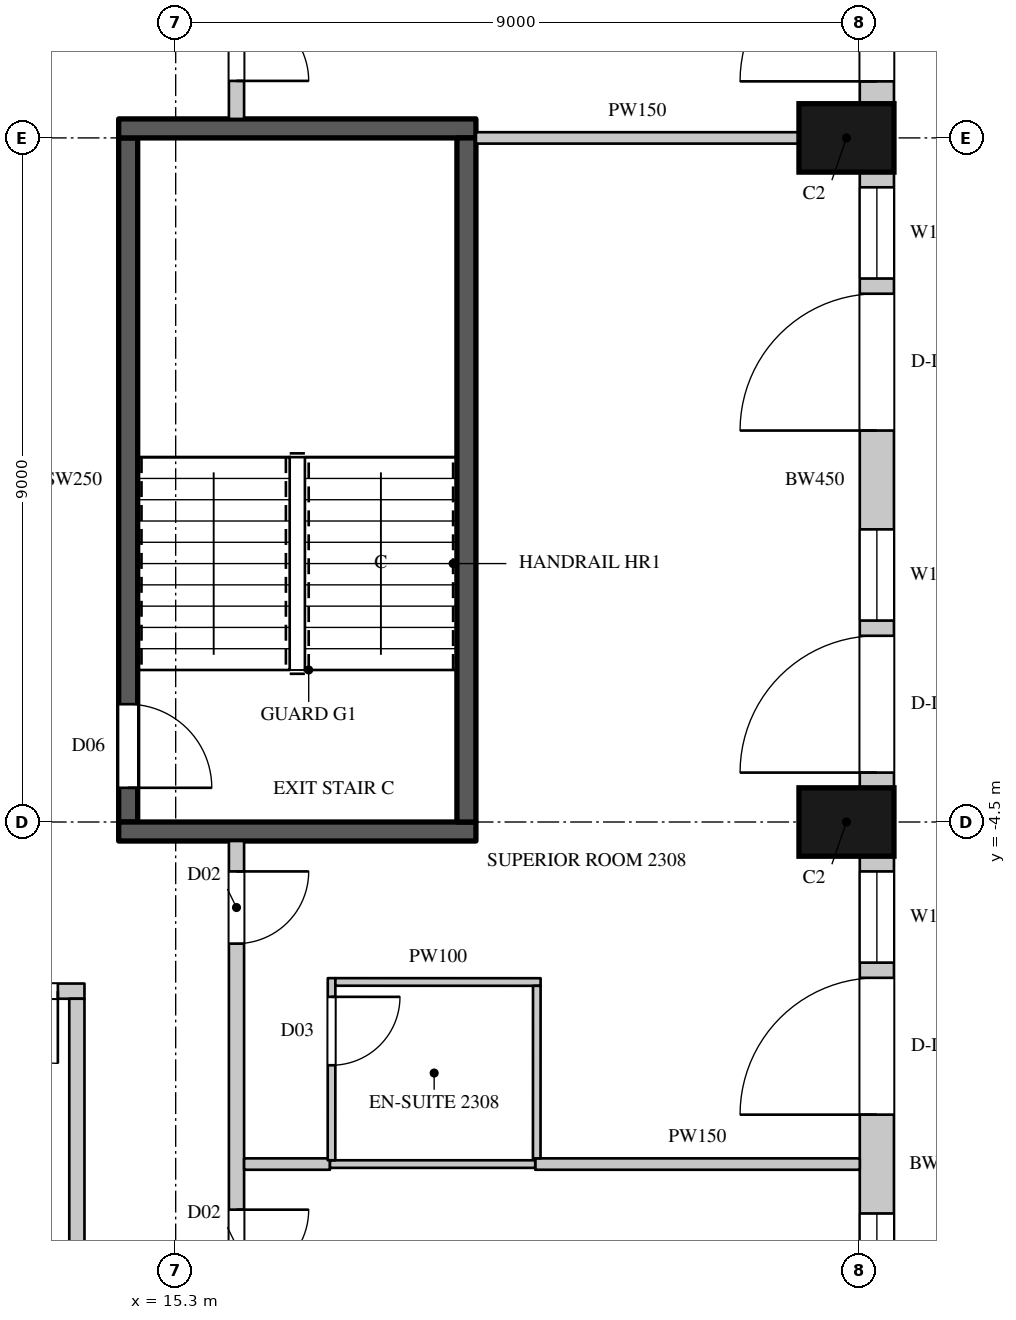
"""IFC4 building model, lengths in metres.
Left out: names, types, materials, properties, quantities, classifications, styles, units other than length and angle.
Written with IfcOpenShell. Run it as: python <this file> out.ifc"""

import sys

from ifc_helpers import new_model, si_unit, direction, frame, frame_2d, origin, origin_2d, place, context, subcontext, project, spatial, rectangle, extrude, element, fill, save


model = new_model("IFC4")
c1 = context("Model", 3, precision=1e-05, world=origin(), true_north=direction((0.0, 1.0)))
c2 = subcontext(c1, "Body", "Model", "MODEL_VIEW")
j1 = project(units=[si_unit("LENGTHUNIT", "METRE"), si_unit("PLANEANGLEUNIT", "RADIAN")], contexts=[c1])
p1 = place(None, origin())
s1 = spatial("IfcSite", under=j1, at=p1, CompositionType="ELEMENT")
p2 = place(p1, origin())
s2 = spatial("IfcBuilding", under=s1, at=p2, CompositionType="ELEMENT")
p3 = place(p2, frame((0.0, 0.0, 113.1)))
s3 = spatial("IfcBuildingStorey", under=s2, at=p3, CompositionType="ELEMENT", Elevation=113.1)
for number, where, z_axis, x_axis in (
    (1, (24.125, -4.5, 0.0), (0.0, 0.0, 1.0), (0.0, 1.0, 0.0)),
    (2, (24.125, 4.5, 0.0), (0.0, 0.0, 1.0), (0.0, 1.0, 0.0)),
):
    element("IfcColumn", number, at=place(p3, frame(where, z_axis=z_axis, x_axis=x_axis)), inside=s3, PredefinedType="COLUMN", context=c2, shape_type="SweptSolid", body=[
        extrude(rectangle(XDim=0.9, YDim=1.25, at=origin_2d()), origin(), (0.0, 0.0, 1.0), 3.6),
    ])
p4 = place(p3, frame((24.525, -13.05, 0.0), z_axis=(0.0, 0.0, 1.0), x_axis=(0.0, 1.0, 0.0)))
e3 = element("IfcWall", 3, at=p4, inside=s3, PredefinedType="SOLIDWALL", context=c2, shape_type="SweptSolid", body=[
    extrude(rectangle(XDim=8.1, YDim=0.45, at=frame_2d((4.05, 0.0))), origin(), (0.0, 0.0, 1.0), 3.3),
])
p5 = place(p4, frame((0.2, 0.0, 0.0)))
e4 = element("IfcOpeningElement", 4, at=p5, cuts=e3, PredefinedType="OPENING", context=c2, shape_type="SweptSolid", body=[
    extrude(rectangle(XDim=1.8, YDim=2.4, at=frame_2d((0.9, 1.2))), frame((0.0, 0.235, 0.0), z_axis=(0.0, -1.0, 0.0), x_axis=(1.0, 0.0, 0.0)), (0.0, 0.0, 1.0), 0.47),
])
p6 = place(p4, frame((2.2, 0.0, 1.05)))
e5 = element("IfcOpeningElement", 5, at=p6, cuts=e3, PredefinedType="OPENING", context=c2, shape_type="SweptSolid", body=[
    extrude(rectangle(XDim=1.2, YDim=2.0, at=frame_2d((0.6, 1.0))), frame((0.0, 0.235, 0.0), z_axis=(0.0, -1.0, 0.0), x_axis=(1.0, 0.0, 0.0)), (0.0, 0.0, 1.0), 0.47),
])
p7 = place(p4, frame((4.7, 0.0, 0.0)))
e6 = element("IfcOpeningElement", 6, at=p7, cuts=e3, PredefinedType="OPENING", context=c2, shape_type="SweptSolid", body=[
    extrude(rectangle(XDim=1.8, YDim=2.4, at=frame_2d((0.9, 1.2))), frame((0.0, 0.235, 0.0), z_axis=(0.0, -1.0, 0.0), x_axis=(1.0, 0.0, 0.0)), (0.0, 0.0, 1.0), 0.47),
])
p8 = place(p4, frame((6.7, 0.0, 1.05)))
e7 = element("IfcOpeningElement", 7, at=p8, cuts=e3, PredefinedType="OPENING", context=c2, shape_type="SweptSolid", body=[
    extrude(rectangle(XDim=1.2, YDim=2.0, at=frame_2d((0.6, 1.0))), frame((0.0, 0.235, 0.0), z_axis=(0.0, -1.0, 0.0), x_axis=(1.0, 0.0, 0.0)), (0.0, 0.0, 1.0), 0.47),
])
p9 = place(p3, frame((24.525, -4.05, 0.0), z_axis=(0.0, 0.0, 1.0), x_axis=(0.0, 1.0, 0.0)))
e8 = element("IfcWall", 8, at=p9, inside=s3, PredefinedType="SOLIDWALL", context=c2, shape_type="SweptSolid", body=[
    extrude(rectangle(XDim=8.1, YDim=0.45, at=frame_2d((4.05, 0.0))), origin(), (0.0, 0.0, 1.0), 3.3),
])
p10 = place(p9, frame((0.2, 0.0, 0.0)))
e9 = element("IfcOpeningElement", 9, at=p10, cuts=e8, PredefinedType="OPENING", context=c2, shape_type="SweptSolid", body=[
    extrude(rectangle(XDim=1.8, YDim=2.4, at=frame_2d((0.9, 1.2))), frame((0.0, 0.235, 0.0), z_axis=(0.0, -1.0, 0.0), x_axis=(1.0, 0.0, 0.0)), (0.0, 0.0, 1.0), 0.47),
])
p11 = place(p9, frame((2.2, 0.0, 1.05)))
e10 = element("IfcOpeningElement", 10, at=p11, cuts=e8, PredefinedType="OPENING", context=c2, shape_type="SweptSolid", body=[
    extrude(rectangle(XDim=1.2, YDim=2.0, at=frame_2d((0.6, 1.0))), frame((0.0, 0.235, 0.0), z_axis=(0.0, -1.0, 0.0), x_axis=(1.0, 0.0, 0.0)), (0.0, 0.0, 1.0), 0.47),
])
p12 = place(p9, frame((4.7, 0.0, 0.0)))
e11 = element("IfcOpeningElement", 11, at=p12, cuts=e8, PredefinedType="OPENING", context=c2, shape_type="SweptSolid", body=[
    extrude(rectangle(XDim=1.8, YDim=2.4, at=frame_2d((0.9, 1.2))), frame((0.0, 0.235, 0.0), z_axis=(0.0, -1.0, 0.0), x_axis=(1.0, 0.0, 0.0)), (0.0, 0.0, 1.0), 0.47),
])
p13 = place(p9, frame((6.7, 0.0, 1.05)))
e12 = element("IfcOpeningElement", 12, at=p13, cuts=e8, PredefinedType="OPENING", context=c2, shape_type="SweptSolid", body=[
    extrude(rectangle(XDim=1.2, YDim=2.0, at=frame_2d((0.6, 1.0))), frame((0.0, 0.235, 0.0), z_axis=(0.0, -1.0, 0.0), x_axis=(1.0, 0.0, 0.0)), (0.0, 0.0, 1.0), 0.47),
])
p14 = place(p3, frame((24.525, 4.95, 0.0), z_axis=(0.0, 0.0, 1.0), x_axis=(0.0, 1.0, 0.0)))
e13 = element("IfcWall", 13, at=p14, inside=s3, PredefinedType="SOLIDWALL", context=c2, shape_type="SweptSolid", body=[
    extrude(rectangle(XDim=8.439, YDim=0.45, at=frame_2d((4.219, 0.0))), origin(), (0.0, 0.0, 1.0), 3.3),
])
p15 = place(p14, frame((0.294, 0.0, 0.0)))
e14 = element("IfcOpeningElement", 14, at=p15, cuts=e13, PredefinedType="OPENING", context=c2, shape_type="SweptSolid", body=[
    extrude(rectangle(XDim=1.8, YDim=2.4, at=frame_2d((0.9, 1.2))), frame((0.0, 0.235, 0.0), z_axis=(0.0, -1.0, 0.0), x_axis=(1.0, 0.0, 0.0)), (0.0, 0.0, 1.0), 0.47),
])
p16 = place(p14, frame((2.294, 0.0, 1.05)))
e15 = element("IfcOpeningElement", 15, at=p16, cuts=e13, PredefinedType="OPENING", context=c2, shape_type="SweptSolid", body=[
    extrude(rectangle(XDim=1.2, YDim=2.0, at=frame_2d((0.6, 1.0))), frame((0.0, 0.235, 0.0), z_axis=(0.0, -1.0, 0.0), x_axis=(1.0, 0.0, 0.0)), (0.0, 0.0, 1.0), 0.47),
])
p17 = place(p14, frame((5.232, 0.0, 1.05)))
e16 = element("IfcOpeningElement", 16, at=p17, cuts=e13, PredefinedType="OPENING", context=c2, shape_type="SweptSolid", body=[
    extrude(rectangle(XDim=2.7, YDim=2.0, at=frame_2d((1.35, 1.0))), frame((0.0, 0.235, 0.0), z_axis=(0.0, -1.0, 0.0), x_axis=(1.0, 0.0, 0.0)), (0.0, 0.0, 1.0), 0.47),
])
p18 = place(p3, frame((10.5, -6.725, 0.0), z_axis=(0.0, 0.0, 1.0), x_axis=(1.0, 0.0, 0.0)))
e17 = element("IfcWall", 17, at=p18, inside=s3, PredefinedType="PARTITIONING", context=c2, shape_type="SweptSolid", body=[
    extrude(rectangle(XDim=3.6, YDim=0.2, at=frame_2d((1.8, 0.0))), origin(), (0.0, 0.0, 1.0), 3.3),
])
p19 = place(p18, frame((2.3, 0.0, 0.0)))
e18 = element("IfcOpeningElement", 18, at=p19, cuts=e17, PredefinedType="OPENING", context=c2, shape_type="SweptSolid", body=[
    extrude(rectangle(XDim=0.95, YDim=2.2, at=frame_2d((0.475, 1.1))), frame((0.0, 0.11, 0.0), z_axis=(0.0, -1.0, 0.0), x_axis=(1.0, 0.0, 0.0)), (0.0, 0.0, 1.0), 0.22),
])
p20 = place(p3, frame((14.0, -15.3, 0.0), z_axis=(0.0, 0.0, 1.0), x_axis=(0.0, 1.0, 0.0)))
e19 = element("IfcWall", 19, at=p20, inside=s3, PredefinedType="PARTITIONING", context=c2, shape_type="SweptSolid", body=[
    extrude(rectangle(XDim=8.475, YDim=0.2, at=frame_2d((4.238, 0.0))), origin(), (0.0, 0.0, 1.0), 3.3),
])
p21 = place(p3, frame((16.1, -17.5, 0.0), z_axis=(0.0, 0.0, 1.0), x_axis=(0.0, 1.0, 0.0)))
e20 = element("IfcWall", 20, at=p21, inside=s3, PredefinedType="PARTITIONING", context=c2, shape_type="SweptSolid", body=[
    extrude(rectangle(XDim=12.75, YDim=0.2, at=frame_2d((6.375, 0.0))), origin(), (0.0, 0.0, 1.0), 3.3),
])
p22 = place(p21, frame((2.75, 0.0, 0.0)))
e21 = element("IfcOpeningElement", 21, at=p22, cuts=e20, PredefinedType="OPENING", context=c2, shape_type="SweptSolid", body=[
    extrude(rectangle(XDim=0.95, YDim=2.2, at=frame_2d((0.475, 1.1))), frame((0.0, 0.11, 0.0), z_axis=(0.0, -1.0, 0.0), x_axis=(1.0, 0.0, 0.0)), (0.0, 0.0, 1.0), 0.22),
])
p23 = place(p21, frame((6.95, 0.0, 0.0)))
e22 = element("IfcOpeningElement", 22, at=p23, cuts=e20, PredefinedType="OPENING", context=c2, shape_type="SweptSolid", body=[
    extrude(rectangle(XDim=0.95, YDim=2.2, at=frame_2d((0.475, 1.1))), frame((0.0, 0.11, 0.0), z_axis=(0.0, -1.0, 0.0), x_axis=(1.0, 0.0, 0.0)), (0.0, 0.0, 1.0), 0.22),
])
p24 = place(p21, frame((11.4, 0.0, 0.0)))
e23 = element("IfcOpeningElement", 23, at=p24, cuts=e20, PredefinedType="OPENING", context=c2, shape_type="SweptSolid", body=[
    extrude(rectangle(XDim=0.95, YDim=2.2, at=frame_2d((0.475, 1.1))), frame((0.0, 0.11, 0.0), z_axis=(0.0, -1.0, 0.0), x_axis=(1.0, 0.0, 0.0)), (0.0, 0.0, 1.0), 0.22),
])
p25 = place(p3, frame((16.1, 4.75, 0.0), z_axis=(0.0, 0.0, 1.0), x_axis=(0.0, 1.0, 0.0)))
e24 = element("IfcWall", 24, at=p25, inside=s3, PredefinedType="PARTITIONING", context=c2, shape_type="SweptSolid", body=[
    extrude(rectangle(XDim=12.65, YDim=0.2, at=frame_2d((6.325, 0.0))), origin(), (0.0, 0.0, 1.0), 3.3),
])
p26 = place(p25, frame((0.5, 0.0, 0.0)))
e25 = element("IfcOpeningElement", 25, at=p26, cuts=e24, PredefinedType="OPENING", context=c2, shape_type="SweptSolid", body=[
    extrude(rectangle(XDim=0.95, YDim=2.2, at=frame_2d((0.475, 1.1))), frame((0.0, 0.11, 0.0), z_axis=(0.0, -1.0, 0.0), x_axis=(1.0, 0.0, 0.0)), (0.0, 0.0, 1.0), 0.22),
])
p27 = place(p25, frame((6.9, 0.0, 0.0)))
e26 = element("IfcOpeningElement", 26, at=p27, cuts=e24, PredefinedType="OPENING", context=c2, shape_type="SweptSolid", body=[
    extrude(rectangle(XDim=0.95, YDim=2.2, at=frame_2d((0.475, 1.1))), frame((0.0, 0.11, 0.0), z_axis=(0.0, -1.0, 0.0), x_axis=(1.0, 0.0, 0.0)), (0.0, 0.0, 1.0), 0.22),
])
p28 = place(p3, frame((16.2, -9.0, 0.0), z_axis=(0.0, 0.0, 1.0), x_axis=(1.0, 0.0, 0.0)))
e27 = element("IfcWall", 27, at=p28, inside=s3, PredefinedType="PARTITIONING", context=c2, shape_type="SweptSolid", body=[
    extrude(rectangle(XDim=1.13, YDim=0.15, at=frame_2d((0.565, 0.0))), origin(), (0.0, 0.0, 1.0), 2.65),
])
p29 = place(p3, frame((19.25, 4.5, 0.0), z_axis=(0.0, 0.0, 1.0), x_axis=(1.0, 0.0, 0.0)))
e28 = element("IfcWall", 28, at=p29, inside=s3, PredefinedType="PARTITIONING", context=c2, shape_type="SweptSolid", body=[
    extrude(rectangle(XDim=4.25, YDim=0.15, at=frame_2d((2.125, 0.0))), origin(), (0.0, 0.0, 1.0), 3.3),
])
p30 = place(p3, frame((20.03, -9.0, 0.0), z_axis=(0.0, 0.0, 1.0), x_axis=(1.0, 0.0, 0.0)))
e29 = element("IfcWall", 29, at=p30, inside=s3, PredefinedType="PARTITIONING", context=c2, shape_type="SweptSolid", body=[
    extrude(rectangle(XDim=4.27, YDim=0.15, at=frame_2d((2.135, 0.0))), origin(), (0.0, 0.0, 1.0), 2.65),
])
p31 = place(p3, frame((14.675, -4.5, 0.0), z_axis=(0.0, 0.0, 1.0), x_axis=(0.0, 1.0, 0.0)))
e30 = element("IfcWall", 30, at=p31, inside=s3, PredefinedType="SHEAR", context=c2, shape_type="SweptSolid", body=[
    extrude(rectangle(XDim=9.0, YDim=0.25, at=frame_2d((4.5, 0.0))), origin(), (0.0, 0.0, 1.0), 3.3),
])
p32 = place(p31, frame((0.45, 0.0, 0.0)))
e31 = element("IfcOpeningElement", 31, at=p32, cuts=e30, PredefinedType="OPENING", context=c2, shape_type="SweptSolid", body=[
    extrude(rectangle(XDim=1.1, YDim=2.2, at=frame_2d((0.55, 1.1))), frame((0.0, 0.135, 0.0), z_axis=(0.0, -1.0, 0.0), x_axis=(1.0, 0.0, 0.0)), (0.0, 0.0, 1.0), 0.27),
])
for number, where, z_axis, x_axis in (
    (32, (14.55, -4.625, 0.0), (0.0, 0.0, 1.0), (1.0, 0.0, 0.0)),
    (33, (14.55, 4.625, 0.0), (0.0, 0.0, 1.0), (1.0, 0.0, 0.0)),
):
    element("IfcWall", number, at=place(p3, frame(where, z_axis=z_axis, x_axis=x_axis)), inside=s3, PredefinedType="SHEAR", context=c2, shape_type="SweptSolid", body=[
        extrude(rectangle(XDim=4.7, YDim=0.25, at=frame_2d((2.35, 0.0))), origin(), (0.0, 0.0, 1.0), 3.3),
    ])
p33 = place(p3, frame((19.125, -4.5, 0.0), z_axis=(0.0, 0.0, 1.0), x_axis=(0.0, 1.0, 0.0)))
e34 = element("IfcWall", 34, at=p33, inside=s3, PredefinedType="SHEAR", context=c2, shape_type="SweptSolid", body=[
    extrude(rectangle(XDim=9.0, YDim=0.25, at=frame_2d((4.5, 0.0))), origin(), (0.0, 0.0, 1.0), 3.3),
])
p34 = place(p3, frame((17.33, -9.0, 0.0), z_axis=(0.0, 0.0, 1.0), x_axis=(1.0, 0.0, 0.0)))
e35 = element("IfcWall", 35, at=p34, inside=s3, PredefinedType="PARTITIONING", context=c2, shape_type="SweptSolid", body=[
    extrude(rectangle(XDim=2.7, YDim=0.1, at=frame_2d((1.35, 0.0))), origin(), (0.0, 0.0, 1.0), 2.65),
])
p35 = place(p3, frame((17.35, -8.95, 0.0), z_axis=(0.0, 0.0, 1.0), x_axis=(0.000407580973, 0.999999916939, 0.0)))
e36 = element("IfcWall", 36, at=p35, inside=s3, PredefinedType="PARTITIONING", context=c2, shape_type="SweptSolid", body=[
    extrude(rectangle(XDim=2.396, YDim=0.1, at=frame_2d((1.198, 0.0))), origin(), (0.0, 0.0, 1.0), 3.3),
])
p36 = place(p35, frame((1.25, 0.0, 0.0)))
e37 = element("IfcOpeningElement", 37, at=p36, cuts=e36, PredefinedType="OPENING", context=c2, shape_type="SweptSolid", body=[
    extrude(rectangle(XDim=0.9, YDim=2.2, at=frame_2d((0.45, 1.1))), frame((0.0, 0.06, 0.0), z_axis=(0.0, -1.0, 0.0), x_axis=(1.0, 0.0, 0.0)), (0.0, 0.0, 1.0), 0.12),
])
p37 = place(p3, frame((17.401, -6.604, 0.0), z_axis=(0.0, 0.0, 1.0), x_axis=(0.9999999346, -0.000361663629, 0.0)))
e38 = element("IfcWall", 38, at=p37, inside=s3, PredefinedType="PARTITIONING", context=c2, shape_type="SweptSolid", body=[
    extrude(rectangle(XDim=2.7, YDim=0.1, at=frame_2d((1.35, 0.0))), origin(), (0.0, 0.0, 1.0), 3.3),
])
p38 = place(p3, frame((20.05, -8.925, 0.0), z_axis=(0.0, 0.0, 1.0), x_axis=(0.000430200003, 0.999999907464, 0.0)))
e39 = element("IfcWall", 39, at=p38, inside=s3, PredefinedType="PARTITIONING", context=c2, shape_type="SweptSolid", body=[
    extrude(rectangle(XDim=2.27, YDim=0.1, at=frame_2d((1.135, 0.0))), origin(), (0.0, 0.0, 1.0), 3.3),
])
p39 = place(p6, origin())
e40 = element("IfcWindow", 40, at=p39, inside=s3, PartitioningType="SINGLE_PANEL", PredefinedType="WINDOW", context=c2, shape_type="SweptSolid", body=[
    extrude(rectangle(XDim=1.2, YDim=2.0, at=frame_2d((0.6, 1.0))), frame((0.0, 0.135, 0.0), z_axis=(0.0, -1.0, 0.0), x_axis=(1.0, 0.0, 0.0)), (0.0, 0.0, 1.0), 0.06),
])
fill(e5, e40)
p40 = place(p7, origin())
e41 = element("IfcDoor", 41, at=p40, inside=s3, OperationType="SLIDING_TO_LEFT", PredefinedType="DOOR", context=c2, shape_type="SweptSolid", body=[
    extrude(rectangle(XDim=1.8, YDim=2.4, at=frame_2d((0.9, 1.2))), frame((0.0, 0.13, 0.0), z_axis=(0.0, -1.0, 0.0), x_axis=(1.0, 0.0, 0.0)), (0.0, 0.0, 1.0), 0.05),
])
fill(e6, e41)
p41 = place(p8, origin())
e42 = element("IfcWindow", 42, at=p41, inside=s3, PartitioningType="SINGLE_PANEL", PredefinedType="WINDOW", context=c2, shape_type="SweptSolid", body=[
    extrude(rectangle(XDim=1.2, YDim=2.0, at=frame_2d((0.6, 1.0))), frame((0.0, 0.135, 0.0), z_axis=(0.0, -1.0, 0.0), x_axis=(1.0, 0.0, 0.0)), (0.0, 0.0, 1.0), 0.06),
])
fill(e7, e42)
p42 = place(p10, origin())
e43 = element("IfcDoor", 43, at=p42, inside=s3, OperationType="SLIDING_TO_LEFT", PredefinedType="DOOR", context=c2, shape_type="SweptSolid", body=[
    extrude(rectangle(XDim=1.8, YDim=2.4, at=frame_2d((0.9, 1.2))), frame((0.0, 0.13, 0.0), z_axis=(0.0, -1.0, 0.0), x_axis=(1.0, 0.0, 0.0)), (0.0, 0.0, 1.0), 0.05),
])
fill(e9, e43)
p43 = place(p11, origin())
e44 = element("IfcWindow", 44, at=p43, inside=s3, PartitioningType="SINGLE_PANEL", PredefinedType="WINDOW", context=c2, shape_type="SweptSolid", body=[
    extrude(rectangle(XDim=1.2, YDim=2.0, at=frame_2d((0.6, 1.0))), frame((0.0, 0.135, 0.0), z_axis=(0.0, -1.0, 0.0), x_axis=(1.0, 0.0, 0.0)), (0.0, 0.0, 1.0), 0.06),
])
fill(e10, e44)
p44 = place(p12, origin())
e45 = element("IfcDoor", 45, at=p44, inside=s3, OperationType="SLIDING_TO_LEFT", PredefinedType="DOOR", context=c2, shape_type="SweptSolid", body=[
    extrude(rectangle(XDim=1.8, YDim=2.4, at=frame_2d((0.9, 1.2))), frame((0.0, 0.13, 0.0), z_axis=(0.0, -1.0, 0.0), x_axis=(1.0, 0.0, 0.0)), (0.0, 0.0, 1.0), 0.05),
])
fill(e11, e45)
p45 = place(p13, origin())
e46 = element("IfcWindow", 46, at=p45, inside=s3, PartitioningType="SINGLE_PANEL", PredefinedType="WINDOW", context=c2, shape_type="SweptSolid", body=[
    extrude(rectangle(XDim=1.2, YDim=2.0, at=frame_2d((0.6, 1.0))), frame((0.0, 0.135, 0.0), z_axis=(0.0, -1.0, 0.0), x_axis=(1.0, 0.0, 0.0)), (0.0, 0.0, 1.0), 0.06),
])
fill(e12, e46)
p46 = place(p15, origin())
e47 = element("IfcDoor", 47, at=p46, inside=s3, OperationType="SLIDING_TO_LEFT", PredefinedType="DOOR", context=c2, shape_type="SweptSolid", body=[
    extrude(rectangle(XDim=1.8, YDim=2.4, at=frame_2d((0.9, 1.2))), frame((0.0, 0.13, 0.0), z_axis=(0.0, -1.0, 0.0), x_axis=(1.0, 0.0, 0.0)), (0.0, 0.0, 1.0), 0.05),
])
fill(e14, e47)
p47 = place(p19, origin())
e48 = element("IfcDoor", 48, at=p47, inside=s3, OperationType="SINGLE_SWING_LEFT", PredefinedType="DOOR", context=c2, shape_type="SweptSolid", body=[
    extrude(rectangle(XDim=0.95, YDim=2.2, at=frame_2d((0.475, 1.1))), frame((0.0, 0.025, 0.0), z_axis=(0.0, -1.0, 0.0), x_axis=(1.0, 0.0, 0.0)), (0.0, 0.0, 1.0), 0.05),
])
fill(e18, e48)
p48 = place(p23, origin())
e49 = element("IfcDoor", 49, at=p48, inside=s3, OperationType="SINGLE_SWING_LEFT", PredefinedType="DOOR", context=c2, shape_type="SweptSolid", body=[
    extrude(rectangle(XDim=0.95, YDim=2.2, at=frame_2d((0.475, 1.1))), frame((0.0, 0.025, 0.0), z_axis=(0.0, -1.0, 0.0), x_axis=(1.0, 0.0, 0.0)), (0.0, 0.0, 1.0), 0.05),
])
fill(e22, e49)
p49 = place(p24, origin())
e50 = element("IfcDoor", 50, at=p49, inside=s3, OperationType="SINGLE_SWING_LEFT", PredefinedType="DOOR", context=c2, shape_type="SweptSolid", body=[
    extrude(rectangle(XDim=0.95, YDim=2.2, at=frame_2d((0.475, 1.1))), frame((0.0, 0.025, 0.0), z_axis=(0.0, -1.0, 0.0), x_axis=(1.0, 0.0, 0.0)), (0.0, 0.0, 1.0), 0.05),
])
fill(e23, e50)
p50 = place(p36, origin())
e51 = element("IfcDoor", 51, at=p50, inside=s3, OperationType="SINGLE_SWING_LEFT", PredefinedType="DOOR", context=c2, shape_type="SweptSolid", body=[
    extrude(rectangle(XDim=0.9, YDim=2.2, at=frame_2d((0.45, 1.1))), frame((0.0, 0.025, 0.0), z_axis=(0.0, -1.0, 0.0), x_axis=(1.0, 0.0, 0.0)), (0.0, 0.0, 1.0), 0.05),
])
fill(e37, e51)
p51 = place(p26, origin())
e52 = element("IfcDoor", 52, at=p51, inside=s3, OperationType="SINGLE_SWING_RIGHT", PredefinedType="DOOR", context=c2, shape_type="SweptSolid", body=[
    extrude(rectangle(XDim=0.95, YDim=2.2, at=frame_2d((0.475, 1.1))), frame((0.0, 0.025, 0.0), z_axis=(0.0, -1.0, 0.0), x_axis=(1.0, 0.0, 0.0)), (0.0, 0.0, 1.0), 0.05),
])
fill(e25, e52)
p52 = place(p32, origin())
e53 = element("IfcDoor", 53, at=p52, inside=s3, OperationType="SINGLE_SWING_RIGHT", PredefinedType="DOOR", context=c2, shape_type="SweptSolid", body=[
    extrude(rectangle(XDim=1.1, YDim=2.2, at=frame_2d((0.55, 1.1))), frame((0.0, 0.025, 0.0), z_axis=(0.0, -1.0, 0.0), x_axis=(1.0, 0.0, 0.0)), (0.0, 0.0, 1.0), 0.05),
])
fill(e31, e53)
save(model, sys.argv[1])
